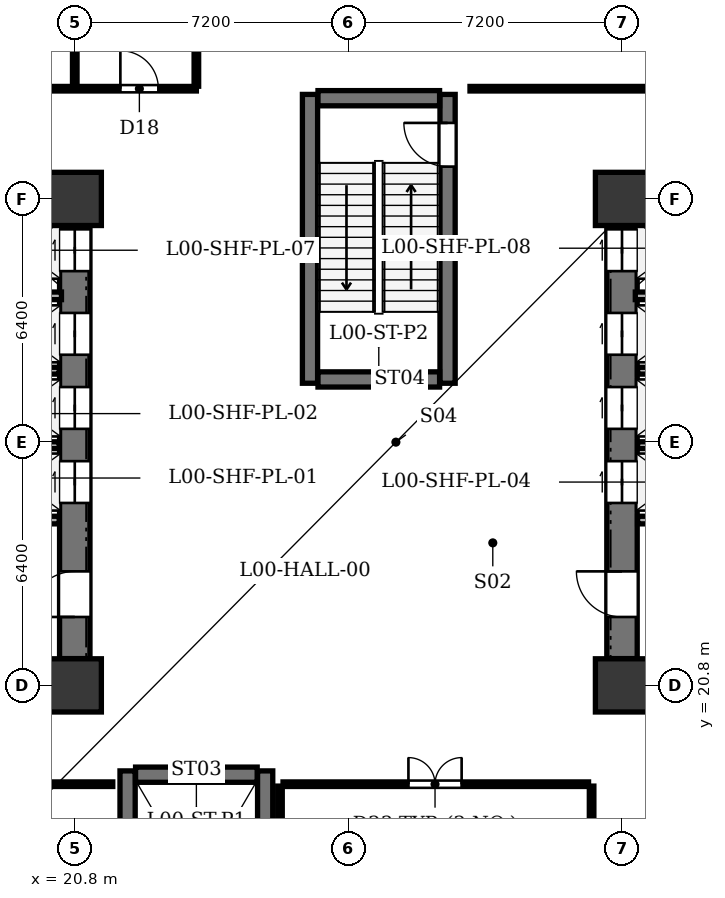
"""IFC4 building model, lengths in metres.
Left out: names, types, materials, properties, quantities, classifications, styles, units other than length and angle.
Written with IfcOpenShell. Run it as: python <this file> out.ifc"""

import sys

from ifc_helpers import new_model, si_unit, direction, frame, frame_2d, origin, origin_2d, place, context, subcontext, project, spatial, rectangle, extrude, element, fill, save


model = new_model("IFC4")
c1 = context("Model", 3, precision=1e-05, world=origin(), true_north=direction((0.0, 1.0)))
c2 = subcontext(c1, "Body", "Model", "MODEL_VIEW")
j1 = project(units=[si_unit("LENGTHUNIT", "METRE"), si_unit("PLANEANGLEUNIT", "RADIAN")], contexts=[c1])
p1 = place(None, origin())
s1 = spatial("IfcSite", under=j1, at=p1, CompositionType="ELEMENT")
p2 = place(p1, origin())
s2 = spatial("IfcBuilding", under=s1, at=p2, CompositionType="ELEMENT")
p3 = place(p2, origin())
s3 = spatial("IfcBuildingStorey", under=s2, at=p3, CompositionType="ELEMENT", Elevation=0.0)
for number, where, z_axis, x_axis in (
    (1, (20.8, 20.8, 0.0), (0.0, 0.0, 1.0), (1.0, 0.0, 0.0)),
    (2, (20.8, 33.6, 0.0), (0.0, 0.0, 1.0), (1.0, 0.0, 0.0)),
    (3, (35.2, 20.8, 0.0), (0.0, 0.0, 1.0), (1.0, 0.0, 0.0)),
    (4, (35.2, 33.6, 0.0), (0.0, 0.0, 1.0), (1.0, 0.0, 0.0)),
):
    element("IfcColumn", number, at=place(p3, frame(where, z_axis=z_axis, x_axis=x_axis)), inside=s3, PredefinedType="COLUMN", context=c2, shape_type="SweptSolid", body=[
        extrude(rectangle(XDim=1.4, YDim=1.4, at=origin_2d()), origin(), (0.0, 0.0, 1.0), 5.4),
    ])
p4 = place(p3, frame((20.8, 21.505, 0.0), z_axis=(0.0, 0.0, 1.0), x_axis=(0.0, 1.0, 0.0)))
e5 = element("IfcWall", 5, at=p4, inside=s3, PredefinedType="SHEAR", context=c2, shape_type="SweptSolid", body=[
    extrude(rectangle(XDim=11.39, YDim=0.8, at=frame_2d((5.695, 0.0))), origin(), (0.0, 0.0, 1.0), 4.95),
])
p5 = place(p4, frame((1.095, 0.0, 0.0)))
e6 = element("IfcOpeningElement", 6, at=p5, cuts=e5, PredefinedType="OPENING", context=c2, shape_type="SweptSolid", body=[
    extrude(rectangle(XDim=1.2, YDim=2.15, at=frame_2d((0.6, 1.075))), frame((0.0, 0.41, 0.0), z_axis=(0.0, -1.0, 0.0), x_axis=(1.0, 0.0, 0.0)), (0.0, 0.0, 1.0), 0.82),
])
p6 = place(p4, frame((4.095, 0.0, 0.0)))
e7 = element("IfcOpeningElement", 7, at=p6, cuts=e5, PredefinedType="OPENING", context=c2, shape_type="SweptSolid", body=[
    extrude(rectangle(XDim=1.1, YDim=2.1, at=frame_2d((0.55, 1.05))), frame((0.0, 0.41, 0.0), z_axis=(0.0, -1.0, 0.0), x_axis=(1.0, 0.0, 0.0)), (0.0, 0.0, 1.0), 0.82),
])
p7 = place(p4, frame((6.045, 0.0, 0.0)))
e8 = element("IfcOpeningElement", 8, at=p7, cuts=e5, PredefinedType="OPENING", context=c2, shape_type="SweptSolid", body=[
    extrude(rectangle(XDim=1.1, YDim=2.1, at=frame_2d((0.55, 1.05))), frame((0.0, 0.41, 0.0), z_axis=(0.0, -1.0, 0.0), x_axis=(1.0, 0.0, 0.0)), (0.0, 0.0, 1.0), 0.82),
])
p8 = place(p4, frame((7.995, 0.0, 0.0)))
e9 = element("IfcOpeningElement", 9, at=p8, cuts=e5, PredefinedType="OPENING", context=c2, shape_type="SweptSolid", body=[
    extrude(rectangle(XDim=1.1, YDim=2.1, at=frame_2d((0.55, 1.05))), frame((0.0, 0.41, 0.0), z_axis=(0.0, -1.0, 0.0), x_axis=(1.0, 0.0, 0.0)), (0.0, 0.0, 1.0), 0.82),
])
p9 = place(p4, frame((10.195, 0.0, 0.0)))
e10 = element("IfcOpeningElement", 10, at=p9, cuts=e5, PredefinedType="OPENING", context=c2, shape_type="SweptSolid", body=[
    extrude(rectangle(XDim=1.1, YDim=2.1, at=frame_2d((0.55, 1.05))), frame((0.0, 0.41, 0.0), z_axis=(0.0, -1.0, 0.0), x_axis=(1.0, 0.0, 0.0)), (0.0, 0.0, 1.0), 0.82),
])
p10 = place(p3, frame((16.6, 25.15, 0.0), z_axis=(0.0, 0.0, 1.0), x_axis=(1.0, 0.0, 0.0)))
e11 = element("IfcWall", 11, at=p10, inside=s3, PredefinedType="SOLIDWALL", context=c2, shape_type="SweptSolid", body=[
    extrude(rectangle(XDim=3.79, YDim=0.2, at=frame_2d((1.895, 0.0))), origin(), (0.0, 0.0, 1.0), 4.95),
])
p11 = place(p10, frame((0.3, 0.0, 0.0)))
e12 = element("IfcOpeningElement", 12, at=p11, cuts=e11, PredefinedType="OPENING", context=c2, shape_type="SweptSolid", body=[
    extrude(rectangle(XDim=0.85, YDim=2.02, at=frame_2d((0.425, 1.01))), frame((0.0, 0.11, 0.0), z_axis=(0.0, -1.0, 0.0), x_axis=(1.0, 0.0, 0.0)), (0.0, 0.0, 1.0), 0.22),
])
p12 = place(p3, frame((16.6, 31.05, 0.0), z_axis=(0.0, 0.0, 1.0), x_axis=(1.0, 0.0, 0.0)))
e13 = element("IfcWall", 13, at=p12, inside=s3, PredefinedType="SOLIDWALL", context=c2, shape_type="SweptSolid", body=[
    extrude(rectangle(XDim=3.85, YDim=0.2, at=frame_2d((1.925, 0.0))), origin(), (0.0, 0.0, 1.0), 4.95),
])
for number, where, z_axis, x_axis in (
    (14, (18.22, 27.12, 0.0), (0.0, 0.0, 1.0), (1.0, 0.0, 0.0)),
    (15, (18.22, 29.08, 0.0), (0.0, 0.0, 1.0), (1.0, 0.0, 0.0)),
):
    element("IfcWall", number, at=place(p3, frame(where, z_axis=z_axis, x_axis=x_axis)), inside=s3, PredefinedType="PARTITIONING", context=c2, shape_type="SweptSolid", body=[
        extrude(rectangle(XDim=2.17, YDim=0.18, at=frame_2d((1.085, 0.0))), origin(), (0.0, 0.0, 1.0), 4.95),
    ])
p13 = place(p3, frame((35.2, 21.505, 0.0), z_axis=(0.0, 0.0, 1.0), x_axis=(0.0, 1.0, 0.0)))
e16 = element("IfcWall", 16, at=p13, inside=s3, PredefinedType="SHEAR", context=c2, shape_type="SweptSolid", body=[
    extrude(rectangle(XDim=11.39, YDim=0.8, at=frame_2d((5.695, 0.0))), origin(), (0.0, 0.0, 1.0), 4.95),
])
p14 = place(p13, frame((1.095, 0.0, 0.0)))
e17 = element("IfcOpeningElement", 17, at=p14, cuts=e16, PredefinedType="OPENING", context=c2, shape_type="SweptSolid", body=[
    extrude(rectangle(XDim=1.2, YDim=2.15, at=frame_2d((0.6, 1.075))), frame((0.0, 0.41, 0.0), z_axis=(0.0, -1.0, 0.0), x_axis=(1.0, 0.0, 0.0)), (0.0, 0.0, 1.0), 0.82),
])
p15 = place(p13, frame((4.095, 0.0, 0.0)))
e18 = element("IfcOpeningElement", 18, at=p15, cuts=e16, PredefinedType="OPENING", context=c2, shape_type="SweptSolid", body=[
    extrude(rectangle(XDim=1.1, YDim=2.1, at=frame_2d((0.55, 1.05))), frame((0.0, 0.41, 0.0), z_axis=(0.0, -1.0, 0.0), x_axis=(1.0, 0.0, 0.0)), (0.0, 0.0, 1.0), 0.82),
])
p16 = place(p13, frame((6.045, 0.0, 0.0)))
e19 = element("IfcOpeningElement", 19, at=p16, cuts=e16, PredefinedType="OPENING", context=c2, shape_type="SweptSolid", body=[
    extrude(rectangle(XDim=1.1, YDim=2.1, at=frame_2d((0.55, 1.05))), frame((0.0, 0.41, 0.0), z_axis=(0.0, -1.0, 0.0), x_axis=(1.0, 0.0, 0.0)), (0.0, 0.0, 1.0), 0.82),
])
p17 = place(p13, frame((7.995, 0.0, 0.0)))
e20 = element("IfcOpeningElement", 20, at=p17, cuts=e16, PredefinedType="OPENING", context=c2, shape_type="SweptSolid", body=[
    extrude(rectangle(XDim=1.1, YDim=2.1, at=frame_2d((0.55, 1.05))), frame((0.0, 0.41, 0.0), z_axis=(0.0, -1.0, 0.0), x_axis=(1.0, 0.0, 0.0)), (0.0, 0.0, 1.0), 0.82),
])
p18 = place(p13, frame((10.195, 0.0, 0.0)))
e21 = element("IfcOpeningElement", 21, at=p18, cuts=e16, PredefinedType="OPENING", context=c2, shape_type="SweptSolid", body=[
    extrude(rectangle(XDim=1.1, YDim=2.1, at=frame_2d((0.55, 1.05))), frame((0.0, 0.41, 0.0), z_axis=(0.0, -1.0, 0.0), x_axis=(1.0, 0.0, 0.0)), (0.0, 0.0, 1.0), 0.82),
])
p19 = place(p3, frame((35.61, 25.15, 0.0), z_axis=(0.0, 0.0, 1.0), x_axis=(1.0, 0.0, 0.0)))
e22 = element("IfcWall", 22, at=p19, inside=s3, PredefinedType="SOLIDWALL", context=c2, shape_type="SweptSolid", body=[
    extrude(rectangle(XDim=3.79, YDim=0.2, at=frame_2d((1.895, 0.0))), origin(), (0.0, 0.0, 1.0), 4.95),
])
p20 = place(p3, frame((35.55, 31.05, 0.0), z_axis=(0.0, 0.0, 1.0), x_axis=(1.0, 0.0, 0.0)))
e23 = element("IfcWall", 23, at=p20, inside=s3, PredefinedType="SOLIDWALL", context=c2, shape_type="SweptSolid", body=[
    extrude(rectangle(XDim=2.25, YDim=0.2, at=frame_2d((1.125, 0.0))), origin(), (0.0, 0.0, 1.0), 4.95),
])
for number, where, z_axis, x_axis in (
    (24, (35.61, 27.12, 0.0), (0.0, 0.0, 1.0), (1.0, 0.0, 0.0)),
    (25, (35.61, 29.08, 0.0), (0.0, 0.0, 1.0), (1.0, 0.0, 0.0)),
):
    element("IfcWall", number, at=place(p3, frame(where, z_axis=z_axis, x_axis=x_axis)), inside=s3, PredefinedType="PARTITIONING", context=c2, shape_type="SweptSolid", body=[
        extrude(rectangle(XDim=2.17, YDim=0.18, at=frame_2d((1.085, 0.0))), origin(), (0.0, 0.0, 1.0), 4.95),
    ])
p21 = place(p3, frame((22.19, 10.95, 0.0), z_axis=(0.0, 0.0, 1.0), x_axis=(0.0, 1.0, 0.0)))
e26 = element("IfcWall", 26, at=p21, inside=s3, PredefinedType="SHEAR", context=c2, shape_type="SweptSolid", body=[
    extrude(rectangle(XDim=7.6, YDim=0.4, at=frame_2d((3.8, 0.0))), origin(), (0.0, 0.0, 1.0), 4.95),
])
p22 = place(p21, frame((0.35, 0.0, 0.0)))
e27 = element("IfcOpeningElement", 27, at=p22, cuts=e26, PredefinedType="OPENING", context=c2, shape_type="SweptSolid", body=[
    extrude(rectangle(XDim=1.15, YDim=2.15, at=frame_2d((0.575, 1.075))), frame((0.0, 0.21, 0.0), z_axis=(0.0, -1.0, 0.0), x_axis=(1.0, 0.0, 0.0)), (0.0, 0.0, 1.0), 0.42),
])
p23 = place(p3, frame((25.81, 10.95, 0.0), z_axis=(0.0, 0.0, 1.0), x_axis=(0.0, 1.0, 0.0)))
e28 = element("IfcWall", 28, at=p23, inside=s3, PredefinedType="SHEAR", context=c2, shape_type="SweptSolid", body=[
    extrude(rectangle(XDim=7.6, YDim=0.4, at=frame_2d((3.8, 0.0))), origin(), (0.0, 0.0, 1.0), 4.95),
])
p24 = place(p3, frame((22.4, 18.45, 0.0), z_axis=(0.0, 0.0, 1.0), x_axis=(1.0, 0.0, 0.0)))
e29 = element("IfcWall", 29, at=p24, inside=s3, PredefinedType="SHEAR", context=c2, shape_type="SweptSolid", body=[
    extrude(rectangle(XDim=3.2, YDim=0.4, at=frame_2d((1.6, 0.0))), origin(), (0.0, 0.0, 1.0), 4.95),
])
p25 = place(p3, frame((26.99, 28.75, 0.0), z_axis=(0.0, 0.0, 1.0), x_axis=(0.0, 1.0, 0.0)))
e30 = element("IfcWall", 30, at=p25, inside=s3, PredefinedType="SHEAR", context=c2, shape_type="SweptSolid", body=[
    extrude(rectangle(XDim=7.6, YDim=0.4, at=frame_2d((3.8, 0.0))), origin(), (0.0, 0.0, 1.0), 4.95),
])
p26 = place(p3, frame((30.61, 28.75, 0.0), z_axis=(0.0, 0.0, 1.0), x_axis=(0.0, 1.0, 0.0)))
e31 = element("IfcWall", 31, at=p26, inside=s3, PredefinedType="SHEAR", context=c2, shape_type="SweptSolid", body=[
    extrude(rectangle(XDim=7.6, YDim=0.4, at=frame_2d((3.8, 0.0))), origin(), (0.0, 0.0, 1.0), 4.95),
])
p27 = place(p26, frame((5.7, 0.0, 0.0)))
e32 = element("IfcOpeningElement", 32, at=p27, cuts=e31, PredefinedType="OPENING", context=c2, shape_type="SweptSolid", body=[
    extrude(rectangle(XDim=1.15, YDim=2.15, at=frame_2d((0.575, 1.075))), frame((0.0, 0.21, 0.0), z_axis=(0.0, -1.0, 0.0), x_axis=(1.0, 0.0, 0.0)), (0.0, 0.0, 1.0), 0.42),
])
for number, where, z_axis, x_axis in (
    (33, (27.2, 28.85, 0.0), (0.0, 0.0, 1.0), (1.0, 0.0, 0.0)),
    (34, (27.2, 36.25, 0.0), (0.0, 0.0, 1.0), (1.0, 0.0, 0.0)),
):
    element("IfcWall", number, at=place(p3, frame(where, z_axis=z_axis, x_axis=x_axis)), inside=s3, PredefinedType="SHEAR", context=c2, shape_type="SweptSolid", body=[
        extrude(rectangle(XDim=3.2, YDim=0.4, at=frame_2d((1.6, 0.0))), origin(), (0.0, 0.0, 1.0), 4.95),
    ])
p28 = place(p3, frame((26.2, 10.405, 0.0), z_axis=(0.0, 0.0, 1.0), x_axis=(0.0, 1.0, 0.0)))
e35 = element("IfcWall", 35, at=p28, inside=s3, PredefinedType="PARTITIONING", context=c2, shape_type="SweptSolid", body=[
    extrude(rectangle(XDim=7.745, YDim=0.12, at=frame_2d((3.873, 0.0))), origin(), (0.0, 0.0, 1.0), 4.385),
])
p29 = place(p3, frame((34.4, 10.405, 0.0), z_axis=(0.0, 0.0, 1.0), x_axis=(0.0, 1.0, 0.0)))
e36 = element("IfcWall", 36, at=p29, inside=s3, PredefinedType="PARTITIONING", context=c2, shape_type="SweptSolid", body=[
    extrude(rectangle(XDim=7.745, YDim=0.12, at=frame_2d((3.873, 0.0))), origin(), (0.0, 0.0, 1.0), 4.95),
])
p30 = place(p3, frame((26.28, 18.2, 0.0), z_axis=(0.0, 0.0, 1.0), x_axis=(1.0, 0.0, 0.0)))
e37 = element("IfcWall", 37, at=p30, inside=s3, PredefinedType="PARTITIONING", context=c2, shape_type="SweptSolid", body=[
    extrude(rectangle(XDim=8.04, YDim=0.12, at=frame_2d((4.02, 0.0))), origin(), (0.0, 0.0, 1.0), 4.95),
])
p31 = place(p30, frame((3.3, 0.0, 0.0)))
e38 = element("IfcOpeningElement", 38, at=p31, cuts=e37, PredefinedType="OPENING", context=c2, shape_type="SweptSolid", body=[
    extrude(rectangle(XDim=1.4, YDim=2.15, at=frame_2d((0.7, 1.075))), frame((0.0, 0.07, 0.0), z_axis=(0.0, -1.0, 0.0), x_axis=(1.0, 0.0, 0.0)), (0.0, 0.0, 1.0), 0.14),
])
p32 = place(p3, frame((12.4, 18.2, 0.0), z_axis=(0.0, 0.0, 1.0), x_axis=(1.0, 0.0, 0.0)))
e39 = element("IfcWall", 39, at=p32, inside=s3, PredefinedType="PARTITIONING", context=c2, shape_type="SweptSolid", body=[
    extrude(rectangle(XDim=9.4, YDim=0.12, at=frame_2d((4.7, 0.0))), origin(), (0.0, 0.0, 1.0), 4.95),
])
p33 = place(p32, frame((4.0, 0.0, 0.0)))
e40 = element("IfcOpeningElement", 40, at=p33, cuts=e39, PredefinedType="OPENING", context=c2, shape_type="SweptSolid", body=[
    extrude(rectangle(XDim=1.4, YDim=2.15, at=frame_2d((0.7, 1.075))), frame((0.0, 0.07, 0.0), z_axis=(0.0, -1.0, 0.0), x_axis=(1.0, 0.0, 0.0)), (0.0, 0.0, 1.0), 0.14),
])
p34 = place(p3, frame((12.9, 36.5, 0.0), z_axis=(0.0, 0.0, 1.0), x_axis=(1.0, 0.0, 0.0)))
e41 = element("IfcWall", 41, at=p34, inside=s3, PredefinedType="PARTITIONING", context=c2, shape_type="SweptSolid", body=[
    extrude(rectangle(XDim=11.1, YDim=0.12, at=frame_2d((5.55, 0.0))), origin(), (0.0, 0.0, 1.0), 4.95),
])
p35 = place(p34, frame((1.4, 0.0, 0.0)))
e42 = element("IfcOpeningElement", 42, at=p35, cuts=e41, PredefinedType="OPENING", context=c2, shape_type="SweptSolid", body=[
    extrude(rectangle(XDim=0.95, YDim=2.1, at=frame_2d((0.475, 1.05))), frame((0.0, 0.07, 0.0), z_axis=(0.0, -1.0, 0.0), x_axis=(1.0, 0.0, 0.0)), (0.0, 0.0, 1.0), 0.14),
])
p36 = place(p34, frame((5.4, 0.0, 0.0)))
e43 = element("IfcOpeningElement", 43, at=p36, cuts=e41, PredefinedType="OPENING", context=c2, shape_type="SweptSolid", body=[
    extrude(rectangle(XDim=0.95, YDim=2.1, at=frame_2d((0.475, 1.05))), frame((0.0, 0.07, 0.0), z_axis=(0.0, -1.0, 0.0), x_axis=(1.0, 0.0, 0.0)), (0.0, 0.0, 1.0), 0.14),
])
p37 = place(p34, frame((9.1, 0.0, 0.0)))
e44 = element("IfcOpeningElement", 44, at=p37, cuts=e41, PredefinedType="OPENING", context=c2, shape_type="SweptSolid", body=[
    extrude(rectangle(XDim=1.0, YDim=2.1, at=frame_2d((0.5, 1.05))), frame((0.0, 0.07, 0.0), z_axis=(0.0, -1.0, 0.0), x_axis=(1.0, 0.0, 0.0)), (0.0, 0.0, 1.0), 0.14),
])
p38 = place(p3, frame((20.8, 36.58, 0.0), z_axis=(0.0, 0.0, 1.0), x_axis=(0.0, 1.0, 0.0)))
e45 = element("IfcWall", 45, at=p38, inside=s3, PredefinedType="PARTITIONING", context=c2, shape_type="SweptSolid", body=[
    extrude(rectangle(XDim=7.415, YDim=0.12, at=frame_2d((3.708, 0.0))), origin(), (0.0, 0.0, 1.0), 3.135),
])
p39 = place(p3, frame((24.0, 36.565, 0.0), z_axis=(0.0, 0.0, 1.0), x_axis=(0.0, 1.0, 0.0)))
e46 = element("IfcWall", 46, at=p39, inside=s3, PredefinedType="PARTITIONING", context=c2, shape_type="SweptSolid", body=[
    extrude(rectangle(XDim=7.43, YDim=0.12, at=frame_2d((3.715, 0.0))), origin(), (0.0, 0.0, 1.0), 4.95),
])
p40 = place(p3, frame((31.2, 36.5, 0.0), z_axis=(0.0, 0.0, 1.0), x_axis=(1.0, 0.0, 0.0)))
e47 = element("IfcWall", 47, at=p40, inside=s3, PredefinedType="PARTITIONING", context=c2, shape_type="SweptSolid", body=[
    extrude(rectangle(XDim=11.9, YDim=0.12, at=frame_2d((5.95, 0.0))), origin(), (0.0, 0.0, 1.0), 4.95),
])
p41 = place(p40, frame((5.2, 0.0, 0.0)))
e48 = element("IfcOpeningElement", 48, at=p41, cuts=e47, PredefinedType="OPENING", context=c2, shape_type="SweptSolid", body=[
    extrude(rectangle(XDim=1.5, YDim=2.15, at=frame_2d((0.75, 1.075))), frame((0.0, 0.07, 0.0), z_axis=(0.0, -1.0, 0.0), x_axis=(1.0, 0.0, 0.0)), (0.0, 0.0, 1.0), 0.14),
])
p42 = place(p5, origin())
e49 = element("IfcDoor", 49, at=p42, inside=s3, OperationType="SINGLE_SWING_LEFT", PredefinedType="DOOR", context=c2, shape_type="SweptSolid", body=[
    extrude(rectangle(XDim=1.2, YDim=2.15, at=frame_2d((0.6, 1.075))), frame((0.0, 0.025, 0.0), z_axis=(0.0, -1.0, 0.0), x_axis=(1.0, 0.0, 0.0)), (0.0, 0.0, 1.0), 0.05),
])
fill(e6, e49)
p43 = place(p6, origin())
e50 = element("IfcDoor", 50, at=p43, inside=s3, OperationType="DOUBLE_DOOR_SLIDING", PredefinedType="DOOR", context=c2, shape_type="SweptSolid", body=[
    extrude(rectangle(XDim=1.1, YDim=2.1, at=frame_2d((0.55, 1.05))), frame((0.0, 0.025, 0.0), z_axis=(0.0, -1.0, 0.0), x_axis=(1.0, 0.0, 0.0)), (0.0, 0.0, 1.0), 0.05),
])
fill(e7, e50)
p44 = place(p7, origin())
e51 = element("IfcDoor", 51, at=p44, inside=s3, OperationType="DOUBLE_DOOR_SLIDING", PredefinedType="DOOR", context=c2, shape_type="SweptSolid", body=[
    extrude(rectangle(XDim=1.1, YDim=2.1, at=frame_2d((0.55, 1.05))), frame((0.0, 0.025, 0.0), z_axis=(0.0, -1.0, 0.0), x_axis=(1.0, 0.0, 0.0)), (0.0, 0.0, 1.0), 0.05),
])
fill(e8, e51)
p45 = place(p8, origin())
e52 = element("IfcDoor", 52, at=p45, inside=s3, OperationType="DOUBLE_DOOR_SLIDING", PredefinedType="DOOR", context=c2, shape_type="SweptSolid", body=[
    extrude(rectangle(XDim=1.1, YDim=2.1, at=frame_2d((0.55, 1.05))), frame((0.0, 0.025, 0.0), z_axis=(0.0, -1.0, 0.0), x_axis=(1.0, 0.0, 0.0)), (0.0, 0.0, 1.0), 0.05),
])
fill(e9, e52)
p46 = place(p9, origin())
e53 = element("IfcDoor", 53, at=p46, inside=s3, OperationType="DOUBLE_DOOR_SLIDING", PredefinedType="DOOR", context=c2, shape_type="SweptSolid", body=[
    extrude(rectangle(XDim=1.1, YDim=2.1, at=frame_2d((0.55, 1.05))), frame((0.0, 0.025, 0.0), z_axis=(0.0, -1.0, 0.0), x_axis=(1.0, 0.0, 0.0)), (0.0, 0.0, 1.0), 0.05),
])
fill(e10, e53)
p47 = place(p14, origin())
e54 = element("IfcDoor", 54, at=p47, inside=s3, OperationType="SINGLE_SWING_RIGHT", PredefinedType="DOOR", context=c2, shape_type="SweptSolid", body=[
    extrude(rectangle(XDim=1.2, YDim=2.15, at=frame_2d((0.6, 1.075))), frame((0.0, 0.025, 0.0), z_axis=(0.0, -1.0, 0.0), x_axis=(1.0, 0.0, 0.0)), (0.0, 0.0, 1.0), 0.05),
])
fill(e17, e54)
p48 = place(p15, origin())
e55 = element("IfcDoor", 55, at=p48, inside=s3, OperationType="DOUBLE_DOOR_SLIDING", PredefinedType="DOOR", context=c2, shape_type="SweptSolid", body=[
    extrude(rectangle(XDim=1.1, YDim=2.1, at=frame_2d((0.55, 1.05))), frame((0.0, 0.025, 0.0), z_axis=(0.0, -1.0, 0.0), x_axis=(1.0, 0.0, 0.0)), (0.0, 0.0, 1.0), 0.05),
])
fill(e18, e55)
p49 = place(p16, origin())
e56 = element("IfcDoor", 56, at=p49, inside=s3, OperationType="DOUBLE_DOOR_SLIDING", PredefinedType="DOOR", context=c2, shape_type="SweptSolid", body=[
    extrude(rectangle(XDim=1.1, YDim=2.1, at=frame_2d((0.55, 1.05))), frame((0.0, 0.025, 0.0), z_axis=(0.0, -1.0, 0.0), x_axis=(1.0, 0.0, 0.0)), (0.0, 0.0, 1.0), 0.05),
])
fill(e19, e56)
p50 = place(p17, origin())
e57 = element("IfcDoor", 57, at=p50, inside=s3, OperationType="DOUBLE_DOOR_SLIDING", PredefinedType="DOOR", context=c2, shape_type="SweptSolid", body=[
    extrude(rectangle(XDim=1.1, YDim=2.1, at=frame_2d((0.55, 1.05))), frame((0.0, 0.025, 0.0), z_axis=(0.0, -1.0, 0.0), x_axis=(1.0, 0.0, 0.0)), (0.0, 0.0, 1.0), 0.05),
])
fill(e20, e57)
p51 = place(p18, origin())
e58 = element("IfcDoor", 58, at=p51, inside=s3, OperationType="DOUBLE_DOOR_SLIDING", PredefinedType="DOOR", context=c2, shape_type="SweptSolid", body=[
    extrude(rectangle(XDim=1.1, YDim=2.1, at=frame_2d((0.55, 1.05))), frame((0.0, 0.025, 0.0), z_axis=(0.0, -1.0, 0.0), x_axis=(1.0, 0.0, 0.0)), (0.0, 0.0, 1.0), 0.05),
])
fill(e21, e58)
p52 = place(p27, origin())
e59 = element("IfcDoor", 59, at=p52, inside=s3, OperationType="SINGLE_SWING_RIGHT", PredefinedType="DOOR", context=c2, shape_type="SweptSolid", body=[
    extrude(rectangle(XDim=1.15, YDim=2.15, at=frame_2d((0.575, 1.075))), frame((0.0, 0.025, 0.0), z_axis=(0.0, -1.0, 0.0), x_axis=(1.0, 0.0, 0.0)), (0.0, 0.0, 1.0), 0.05),
])
fill(e32, e59)
p53 = place(p31, origin())
e60 = element("IfcDoor", 60, at=p53, inside=s3, OperationType="DOUBLE_DOOR_SINGLE_SWING", PredefinedType="DOOR", context=c2, shape_type="SweptSolid", body=[
    extrude(rectangle(XDim=1.4, YDim=2.15, at=frame_2d((0.7, 1.075))), frame((0.0, 0.025, 0.0), z_axis=(0.0, -1.0, 0.0), x_axis=(1.0, 0.0, 0.0)), (0.0, 0.0, 1.0), 0.05),
])
fill(e38, e60)
p54 = place(p37, origin())
e61 = element("IfcDoor", 61, at=p54, inside=s3, OperationType="SINGLE_SWING_LEFT", PredefinedType="DOOR", context=c2, shape_type="SweptSolid", body=[
    extrude(rectangle(XDim=1.0, YDim=2.1, at=frame_2d((0.5, 1.05))), frame((0.0, 0.025, 0.0), z_axis=(0.0, -1.0, 0.0), x_axis=(1.0, 0.0, 0.0)), (0.0, 0.0, 1.0), 0.05),
])
fill(e44, e61)
save(model, sys.argv[1])
